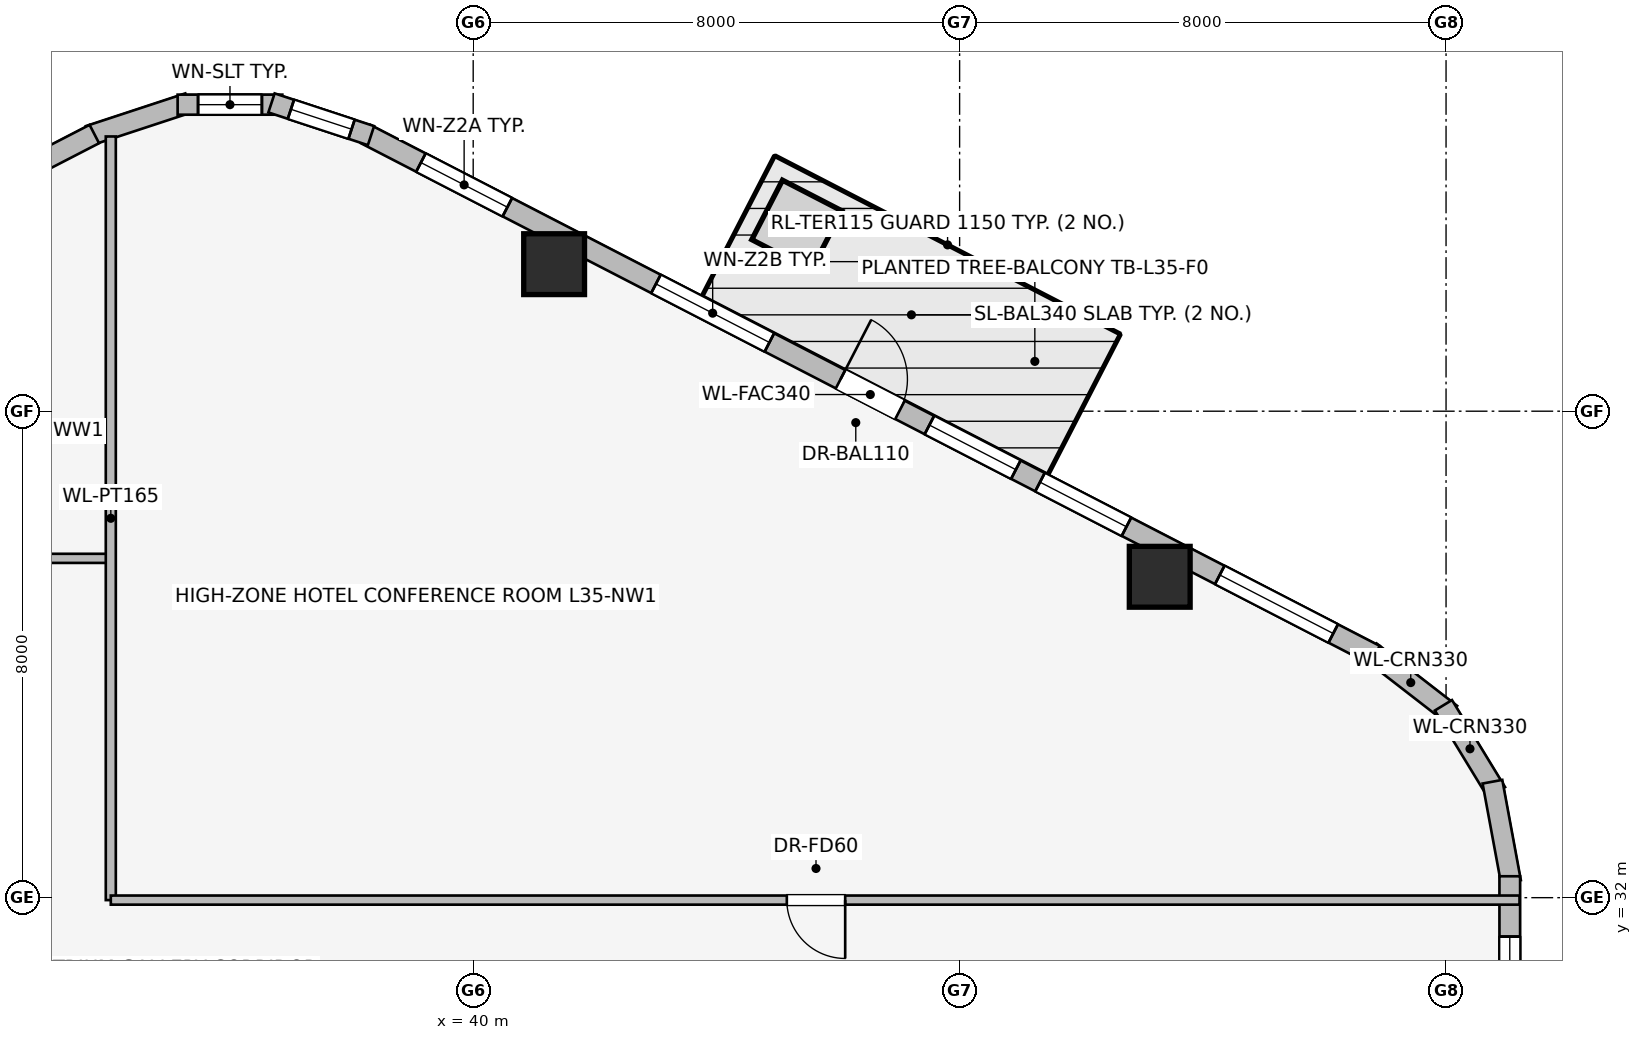
"""IFC4 building model, lengths in metres.
Left out: names, types, materials, properties, quantities, classifications, styles, units other than length and angle.
Written with IfcOpenShell. Run it as: python <this file> out.ifc"""

import sys

from ifc_helpers import new_model, si_unit, direction, frame, frame_2d, origin, origin_2d, place, context, subcontext, project, spatial, rectangle, extrude, element, fill, save


model = new_model("IFC4")
c1 = context("Model", 3, precision=1e-05, world=origin(), true_north=direction((0.0, 1.0)))
c2 = subcontext(c1, "Body", "Model", "MODEL_VIEW")
j1 = project(units=[si_unit("LENGTHUNIT", "METRE"), si_unit("PLANEANGLEUNIT", "RADIAN")], contexts=[c1])
p1 = place(None, origin())
s1 = spatial("IfcSite", under=j1, at=p1, CompositionType="ELEMENT")
p2 = place(p1, origin())
s2 = spatial("IfcBuilding", under=s1, at=p2, CompositionType="ELEMENT")
p3 = place(p2, frame((0.0, 0.0, 132.6)))
s3 = spatial("IfcBuildingStorey", under=s2, at=p3, CompositionType="ELEMENT", Elevation=132.6)
for number, where, z_axis, x_axis in (
    (1, (51.291, 37.277, 0.0), (0.0, 0.0, 1.0), (1.0, 0.0, 0.0)),
    (2, (41.331, 42.418, 0.0), (0.0, 0.0, 1.0), (1.0, 0.0, 0.0)),
):
    element("IfcColumn", number, at=place(p3, frame(where, z_axis=z_axis, x_axis=x_axis)), inside=s3, PredefinedType="COLUMN", context=c2, shape_type="SweptSolid", body=[
        extrude(rectangle(XDim=1.0, YDim=1.0, at=origin_2d()), origin(), (0.0, 0.0, 1.0), 3.45),
    ])
p4 = place(p3, frame((54.757, 36.05, 0.0), z_axis=(0.0, 0.0, 1.0), x_axis=(0.790621329885, -0.612305408053, 0.0)))
e3 = element("IfcWall", 3, at=p4, inside=s3, PredefinedType="STANDARD", context=c2, shape_type="SweptSolid", body=[
    extrude(rectangle(XDim=1.676, YDim=0.33, at=frame_2d((0.838, 0.0))), origin(), (0.0, 0.0, 1.0), 3.19),
])
p5 = place(p3, frame((55.957, 35.164, 0.0), z_axis=(0.0, 0.0, 1.0), x_axis=(0.520519429557, -0.853849824883, 0.0)))
e4 = element("IfcWall", 4, at=p5, inside=s3, PredefinedType="STANDARD", context=c2, shape_type="SweptSolid", body=[
    extrude(rectangle(XDim=1.677, YDim=0.33, at=frame_2d((0.839, 0.0))), origin(), (0.0, 0.0, 1.0), 3.19),
])
p6 = place(p3, frame((56.763, 33.907, 0.0), z_axis=(0.0, 0.0, 1.0), x_axis=(0.181984991895, -0.983301308209, 0.0)))
e5 = element("IfcWall", 5, at=p6, inside=s3, PredefinedType="STANDARD", context=c2, shape_type="SweptSolid", body=[
    extrude(rectangle(XDim=1.677, YDim=0.33, at=frame_2d((0.838, 0.0))), origin(), (0.0, 0.0, 1.0), 3.19),
])
p7 = place(p3, frame((38.231, 44.558, 0.0), z_axis=(0.0, 0.0, 1.0), x_axis=(0.888613612362, -0.458656568606, 0.0)))
e6 = element("IfcWall", 6, at=p7, inside=s3, PredefinedType="STANDARD", context=c2, shape_type="SweptSolid", body=[
    extrude(rectangle(XDim=18.681, YDim=0.34, at=frame_2d((9.34, 0.0))), origin(), (0.0, 0.0, 1.0), 3.19),
])
p8 = place(p7, frame((8.79, 0.0, 0.0)))
e7 = element("IfcOpeningElement", 7, at=p8, cuts=e6, PredefinedType="OPENING", context=c2, shape_type="SweptSolid", body=[
    extrude(rectangle(XDim=1.1, YDim=2.04, at=frame_2d((0.55, 1.02))), frame((0.0, 0.18, 0.0), z_axis=(0.0, -1.0, 0.0), x_axis=(1.0, 0.0, 0.0)), (0.0, 0.0, 1.0), 0.36),
])
p9 = place(p7, frame((1.023, 0.0, 0.75)))
e8 = element("IfcOpeningElement", 8, at=p9, cuts=e6, PredefinedType="OPENING", context=c2, shape_type="SweptSolid", body=[
    extrude(rectangle(XDim=1.6, YDim=1.55, at=frame_2d((0.8, 0.775))), frame((0.0, 0.18, 0.0), z_axis=(0.0, -1.0, 0.0), x_axis=(1.0, 0.0, 0.0)), (0.0, 0.0, 1.0), 0.36),
])
p10 = place(p7, frame((5.373, 0.0, 0.75)))
e9 = element("IfcOpeningElement", 9, at=p10, cuts=e6, PredefinedType="OPENING", context=c2, shape_type="SweptSolid", body=[
    extrude(rectangle(XDim=2.1, YDim=1.5, at=frame_2d((1.05, 0.75))), frame((0.0, 0.18, 0.0), z_axis=(0.0, -1.0, 0.0), x_axis=(1.0, 0.0, 0.0)), (0.0, 0.0, 1.0), 0.36),
])
p11 = place(p7, frame((10.434, 0.0, 0.75)))
e10 = element("IfcOpeningElement", 10, at=p11, cuts=e6, PredefinedType="OPENING", context=c2, shape_type="SweptSolid", body=[
    extrude(rectangle(XDim=1.6, YDim=1.55, at=frame_2d((0.8, 0.775))), frame((0.0, 0.18, 0.0), z_axis=(0.0, -1.0, 0.0), x_axis=(1.0, 0.0, 0.0)), (0.0, 0.0, 1.0), 0.36),
])
p12 = place(p7, frame((12.481, 0.0, 0.75)))
e11 = element("IfcOpeningElement", 11, at=p12, cuts=e6, PredefinedType="OPENING", context=c2, shape_type="SweptSolid", body=[
    extrude(rectangle(XDim=1.6, YDim=1.55, at=frame_2d((0.8, 0.775))), frame((0.0, 0.18, 0.0), z_axis=(0.0, -1.0, 0.0), x_axis=(1.0, 0.0, 0.0)), (0.0, 0.0, 1.0), 0.36),
])
p13 = place(p7, frame((15.808, 0.0, 0.75)))
e12 = element("IfcOpeningElement", 12, at=p13, cuts=e6, PredefinedType="OPENING", context=c2, shape_type="SweptSolid", body=[
    extrude(rectangle(XDim=2.1, YDim=1.5, at=frame_2d((1.05, 0.75))), frame((0.0, 0.18, 0.0), z_axis=(0.0, -1.0, 0.0), x_axis=(1.0, 0.0, 0.0)), (0.0, 0.0, 1.0), 0.36),
])
p14 = place(p3, frame((33.681, 44.532, 0.0), z_axis=(0.0, 0.0, 1.0), x_axis=(0.949937416267, 0.312440242569, 0.0)))
e13 = element("IfcWall", 13, at=p14, inside=s3, PredefinedType="STANDARD", context=c2, shape_type="SweptSolid", body=[
    extrude(rectangle(XDim=1.722, YDim=0.33, at=frame_2d((0.861, 0.0))), origin(), (0.0, 0.0, 1.0), 3.19),
])
p15 = place(p3, frame((35.139, 45.041, 0.0), z_axis=(0.0, 0.0, 1.0), x_axis=(1.0, 0.0, 0.0)))
e14 = element("IfcWall", 14, at=p15, inside=s3, PredefinedType="STANDARD", context=c2, shape_type="SweptSolid", body=[
    extrude(rectangle(XDim=1.722, YDim=0.33, at=frame_2d((0.861, 0.0))), origin(), (0.0, 0.0, 1.0), 3.19),
])
p16 = place(p15, frame((0.336, 0.0, 0.75)))
e15 = element("IfcOpeningElement", 15, at=p16, cuts=e14, PredefinedType="OPENING", context=c2, shape_type="SweptSolid", body=[
    extrude(rectangle(XDim=1.05, YDim=1.4, at=frame_2d((0.525, 0.7))), frame((0.0, 0.175, 0.0), z_axis=(0.0, -1.0, 0.0), x_axis=(1.0, 0.0, 0.0)), (0.0, 0.0, 1.0), 0.35),
])
p17 = place(p3, frame((36.683, 45.07, 0.0), z_axis=(0.0, 0.0, 1.0), x_axis=(0.949937416267, -0.312440242569, 0.0)))
e16 = element("IfcWall", 16, at=p17, inside=s3, PredefinedType="STANDARD", context=c2, shape_type="SweptSolid", body=[
    extrude(rectangle(XDim=1.722, YDim=0.33, at=frame_2d((0.861, 0.0))), origin(), (0.0, 0.0, 1.0), 3.19),
])
p18 = place(p17, frame((0.336, 0.0, 0.75)))
e17 = element("IfcOpeningElement", 17, at=p18, cuts=e16, PredefinedType="OPENING", context=c2, shape_type="SweptSolid", body=[
    extrude(rectangle(XDim=1.05, YDim=1.4, at=frame_2d((0.525, 0.7))), frame((0.0, 0.175, 0.0), z_axis=(0.0, -1.0, 0.0), x_axis=(1.0, 0.0, 0.0)), (0.0, 0.0, 1.0), 0.35),
])
p19 = place(p3, frame((17.169, 35.99, 0.0), z_axis=(0.0, 0.0, 1.0), x_axis=(0.888613612362, 0.458656568606, 0.0)))
e18 = element("IfcWall", 18, at=p19, inside=s3, PredefinedType="STANDARD", context=c2, shape_type="SweptSolid", body=[
    extrude(rectangle(XDim=18.681, YDim=0.34, at=frame_2d((9.34, 0.0))), origin(), (0.0, 0.0, 1.0), 3.19),
])
p20 = place(p19, frame((1.023, 0.0, 0.75)))
e19 = element("IfcOpeningElement", 19, at=p20, cuts=e18, PredefinedType="OPENING", context=c2, shape_type="SweptSolid", body=[
    extrude(rectangle(XDim=1.6, YDim=1.55, at=frame_2d((0.8, 0.775))), frame((0.0, 0.18, 0.0), z_axis=(0.0, -1.0, 0.0), x_axis=(1.0, 0.0, 0.0)), (0.0, 0.0, 1.0), 0.36),
])
p21 = place(p19, frame((4.981, 0.0, 0.75)))
e20 = element("IfcOpeningElement", 20, at=p21, cuts=e18, PredefinedType="OPENING", context=c2, shape_type="SweptSolid", body=[
    extrude(rectangle(XDim=2.1, YDim=1.5, at=frame_2d((1.05, 0.75))), frame((0.0, 0.18, 0.0), z_axis=(0.0, -1.0, 0.0), x_axis=(1.0, 0.0, 0.0)), (0.0, 0.0, 1.0), 0.36),
])
p22 = place(p19, frame((8.29, 0.0, 0.75)))
e21 = element("IfcOpeningElement", 21, at=p22, cuts=e18, PredefinedType="OPENING", context=c2, shape_type="SweptSolid", body=[
    extrude(rectangle(XDim=2.1, YDim=1.5, at=frame_2d((1.05, 0.75))), frame((0.0, 0.18, 0.0), z_axis=(0.0, -1.0, 0.0), x_axis=(1.0, 0.0, 0.0)), (0.0, 0.0, 1.0), 0.36),
])
p23 = place(p19, frame((11.6, 0.0, 0.75)))
e22 = element("IfcOpeningElement", 22, at=p23, cuts=e18, PredefinedType="OPENING", context=c2, shape_type="SweptSolid", body=[
    extrude(rectangle(XDim=2.1, YDim=1.5, at=frame_2d((1.05, 0.75))), frame((0.0, 0.18, 0.0), z_axis=(0.0, -1.0, 0.0), x_axis=(1.0, 0.0, 0.0)), (0.0, 0.0, 1.0), 0.36),
])
p24 = place(p19, frame((16.058, 0.0, 0.75)))
e23 = element("IfcOpeningElement", 23, at=p24, cuts=e18, PredefinedType="OPENING", context=c2, shape_type="SweptSolid", body=[
    extrude(rectangle(XDim=1.6, YDim=1.55, at=frame_2d((0.8, 0.775))), frame((0.0, 0.18, 0.0), z_axis=(0.0, -1.0, 0.0), x_axis=(1.0, 0.0, 0.0)), (0.0, 0.0, 1.0), 0.36),
])
p25 = place(p3, frame((57.048, 32.352, 0.0), z_axis=(0.0, 0.0, 1.0), x_axis=(0.0, -1.0, 0.0)))
e24 = element("IfcWall", 24, at=p25, inside=s3, PredefinedType="STANDARD", context=c2, shape_type="SweptSolid", body=[
    extrude(rectangle(XDim=16.704, YDim=0.34, at=frame_2d((8.352, 0.0))), origin(), (0.0, 0.0, 1.0), 3.19),
])
p26 = place(p25, frame((0.992, 0.0, 0.75)))
e25 = element("IfcOpeningElement", 25, at=p26, cuts=e24, PredefinedType="OPENING", context=c2, shape_type="SweptSolid", body=[
    extrude(rectangle(XDim=1.05, YDim=1.4, at=frame_2d((0.525, 0.7))), frame((0.0, 0.18, 0.0), z_axis=(0.0, -1.0, 0.0), x_axis=(1.0, 0.0, 0.0)), (0.0, 0.0, 1.0), 0.36),
])
p27 = place(p25, frame((4.935, 0.0, 0.75)))
e26 = element("IfcOpeningElement", 26, at=p27, cuts=e24, PredefinedType="OPENING", context=c2, shape_type="SweptSolid", body=[
    extrude(rectangle(XDim=2.1, YDim=1.5, at=frame_2d((1.05, 0.75))), frame((0.0, 0.18, 0.0), z_axis=(0.0, -1.0, 0.0), x_axis=(1.0, 0.0, 0.0)), (0.0, 0.0, 1.0), 0.36),
])
p28 = place(p25, frame((9.919, 0.0, 0.75)))
e27 = element("IfcOpeningElement", 27, at=p28, cuts=e24, PredefinedType="OPENING", context=c2, shape_type="SweptSolid", body=[
    extrude(rectangle(XDim=1.6, YDim=1.55, at=frame_2d((0.8, 0.775))), frame((0.0, 0.18, 0.0), z_axis=(0.0, -1.0, 0.0), x_axis=(1.0, 0.0, 0.0)), (0.0, 0.0, 1.0), 0.36),
])
p29 = place(p25, frame((14.702, 0.0, 0.75)))
e28 = element("IfcOpeningElement", 28, at=p29, cuts=e24, PredefinedType="OPENING", context=c2, shape_type="SweptSolid", body=[
    extrude(rectangle(XDim=1.05, YDim=1.4, at=frame_2d((0.525, 0.7))), frame((0.0, 0.18, 0.0), z_axis=(0.0, -1.0, 0.0), x_axis=(1.0, 0.0, 0.0)), (0.0, 0.0, 1.0), 0.36),
])
p30 = place(p3, frame((34.0, 37.58, 0.0), z_axis=(0.0, 0.0, 1.0), x_axis=(-1.0, 0.0, 0.0)))
e29 = element("IfcWall", 29, at=p30, inside=s3, PredefinedType="PARTITIONING", context=c2, shape_type="SweptSolid", body=[
    extrude(rectangle(XDim=13.707, YDim=0.15, at=frame_2d((6.854, 0.0))), origin(), (0.0, 0.0, 1.0), 2.582),
])
p31 = place(p30, frame((5.195, 0.0, 0.0)))
e30 = element("IfcOpeningElement", 30, at=p31, cuts=e29, PredefinedType="OPENING", context=c2, shape_type="SweptSolid", body=[
    extrude(rectangle(XDim=0.96, YDim=2.0, at=frame_2d((0.48, 1.0))), frame((0.0, 0.085, 0.0), z_axis=(0.0, -1.0, 0.0), x_axis=(1.0, 0.0, 0.0)), (0.0, 0.0, 1.0), 0.17),
])
p32 = place(p3, frame((34.04, 31.96, 0.0), z_axis=(0.0, 0.0, 1.0), x_axis=(0.0, 1.0, 0.0)))
e31 = element("IfcWall", 31, at=p32, inside=s3, PredefinedType="PARTITIONING", context=c2, shape_type="SweptSolid", body=[
    extrude(rectangle(XDim=12.558, YDim=0.165, at=frame_2d((6.279, 0.0))), origin(), (0.0, 0.0, 1.0), 3.19),
])
p33 = place(p3, frame((57.208, 31.96, 0.0), z_axis=(0.0, 0.0, 1.0), x_axis=(-1.0, 0.0, 0.0)))
e32 = element("IfcWall", 32, at=p33, inside=s3, PredefinedType="PARTITIONING", context=c2, shape_type="SweptSolid", body=[
    extrude(rectangle(XDim=23.168, YDim=0.15, at=frame_2d((11.584, 0.0))), origin(), (0.0, 0.0, 1.0), 3.19),
])
p34 = place(p33, frame((11.09, 0.0, 0.0)))
e33 = element("IfcOpeningElement", 33, at=p34, cuts=e32, PredefinedType="OPENING", context=c2, shape_type="SweptSolid", body=[
    extrude(rectangle(XDim=0.96, YDim=2.0, at=frame_2d((0.48, 1.0))), frame((0.0, 0.085, 0.0), z_axis=(0.0, -1.0, 0.0), x_axis=(1.0, 0.0, 0.0)), (0.0, 0.0, 1.0), 0.17),
])
p35 = place(p8, origin())
e34 = element("IfcDoor", 34, at=p35, inside=s3, OperationType="SINGLE_SWING_LEFT", PredefinedType="DOOR", context=c2, shape_type="SweptSolid", body=[
    extrude(rectangle(XDim=1.1, YDim=2.04, at=frame_2d((0.55, 1.02))), frame((0.0, 0.025, 0.0), z_axis=(0.0, -1.0, 0.0), x_axis=(1.0, 0.0, 0.0)), (0.0, 0.0, 1.0), 0.05),
])
fill(e7, e34)
p36 = place(p9, origin())
e35 = element("IfcWindow", 35, at=p36, inside=s3, PartitioningType="SINGLE_PANEL", PredefinedType="WINDOW", context=c2, shape_type="SweptSolid", body=[
    extrude(rectangle(XDim=1.6, YDim=1.55, at=frame_2d((0.8, 0.775))), frame((0.0, 0.03, 0.0), z_axis=(0.0, -1.0, 0.0), x_axis=(1.0, 0.0, 0.0)), (0.0, 0.0, 1.0), 0.06),
])
fill(e8, e35)
p37 = place(p10, origin())
e36 = element("IfcWindow", 36, at=p37, inside=s3, PartitioningType="SINGLE_PANEL", PredefinedType="WINDOW", context=c2, shape_type="SweptSolid", body=[
    extrude(rectangle(XDim=2.1, YDim=1.5, at=frame_2d((1.05, 0.75))), frame((0.0, 0.03, 0.0), z_axis=(0.0, -1.0, 0.0), x_axis=(1.0, 0.0, 0.0)), (0.0, 0.0, 1.0), 0.06),
])
fill(e9, e36)
p38 = place(p11, origin())
e37 = element("IfcWindow", 37, at=p38, inside=s3, PartitioningType="SINGLE_PANEL", PredefinedType="WINDOW", context=c2, shape_type="SweptSolid", body=[
    extrude(rectangle(XDim=1.6, YDim=1.55, at=frame_2d((0.8, 0.775))), frame((0.0, 0.03, 0.0), z_axis=(0.0, -1.0, 0.0), x_axis=(1.0, 0.0, 0.0)), (0.0, 0.0, 1.0), 0.06),
])
fill(e10, e37)
p39 = place(p12, origin())
e38 = element("IfcWindow", 38, at=p39, inside=s3, PartitioningType="SINGLE_PANEL", PredefinedType="WINDOW", context=c2, shape_type="SweptSolid", body=[
    extrude(rectangle(XDim=1.6, YDim=1.55, at=frame_2d((0.8, 0.775))), frame((0.0, 0.03, 0.0), z_axis=(0.0, -1.0, 0.0), x_axis=(1.0, 0.0, 0.0)), (0.0, 0.0, 1.0), 0.06),
])
fill(e11, e38)
p40 = place(p13, origin())
e39 = element("IfcWindow", 39, at=p40, inside=s3, PartitioningType="SINGLE_PANEL", PredefinedType="WINDOW", context=c2, shape_type="SweptSolid", body=[
    extrude(rectangle(XDim=2.1, YDim=1.5, at=frame_2d((1.05, 0.75))), frame((0.0, 0.03, 0.0), z_axis=(0.0, -1.0, 0.0), x_axis=(1.0, 0.0, 0.0)), (0.0, 0.0, 1.0), 0.06),
])
fill(e12, e39)
p41 = place(p16, origin())
e40 = element("IfcWindow", 40, at=p41, inside=s3, PartitioningType="SINGLE_PANEL", PredefinedType="WINDOW", context=c2, shape_type="SweptSolid", body=[
    extrude(rectangle(XDim=1.05, YDim=1.4, at=frame_2d((0.525, 0.7))), frame((0.0, 0.03, 0.0), z_axis=(0.0, -1.0, 0.0), x_axis=(1.0, 0.0, 0.0)), (0.0, 0.0, 1.0), 0.06),
])
fill(e15, e40)
p42 = place(p18, origin())
e41 = element("IfcWindow", 41, at=p42, inside=s3, PartitioningType="SINGLE_PANEL", PredefinedType="WINDOW", context=c2, shape_type="SweptSolid", body=[
    extrude(rectangle(XDim=1.05, YDim=1.4, at=frame_2d((0.525, 0.7))), frame((0.0, 0.03, 0.0), z_axis=(0.0, -1.0, 0.0), x_axis=(1.0, 0.0, 0.0)), (0.0, 0.0, 1.0), 0.06),
])
fill(e17, e41)
p43 = place(p26, origin())
e42 = element("IfcWindow", 42, at=p43, inside=s3, PartitioningType="SINGLE_PANEL", PredefinedType="WINDOW", context=c2, shape_type="SweptSolid", body=[
    extrude(rectangle(XDim=1.05, YDim=1.4, at=frame_2d((0.525, 0.7))), frame((0.0, 0.03, 0.0), z_axis=(0.0, -1.0, 0.0), x_axis=(1.0, 0.0, 0.0)), (0.0, 0.0, 1.0), 0.06),
])
fill(e25, e42)
p44 = place(p34, origin())
e43 = element("IfcDoor", 43, at=p44, inside=s3, OperationType="SINGLE_SWING_LEFT", PredefinedType="DOOR", context=c2, shape_type="SweptSolid", body=[
    extrude(rectangle(XDim=0.96, YDim=2.0, at=frame_2d((0.48, 1.0))), frame((0.0, 0.025, 0.0), z_axis=(0.0, -1.0, 0.0), x_axis=(1.0, 0.0, 0.0)), (0.0, 0.0, 1.0), 0.05),
])
fill(e33, e43)
save(model, sys.argv[1])
